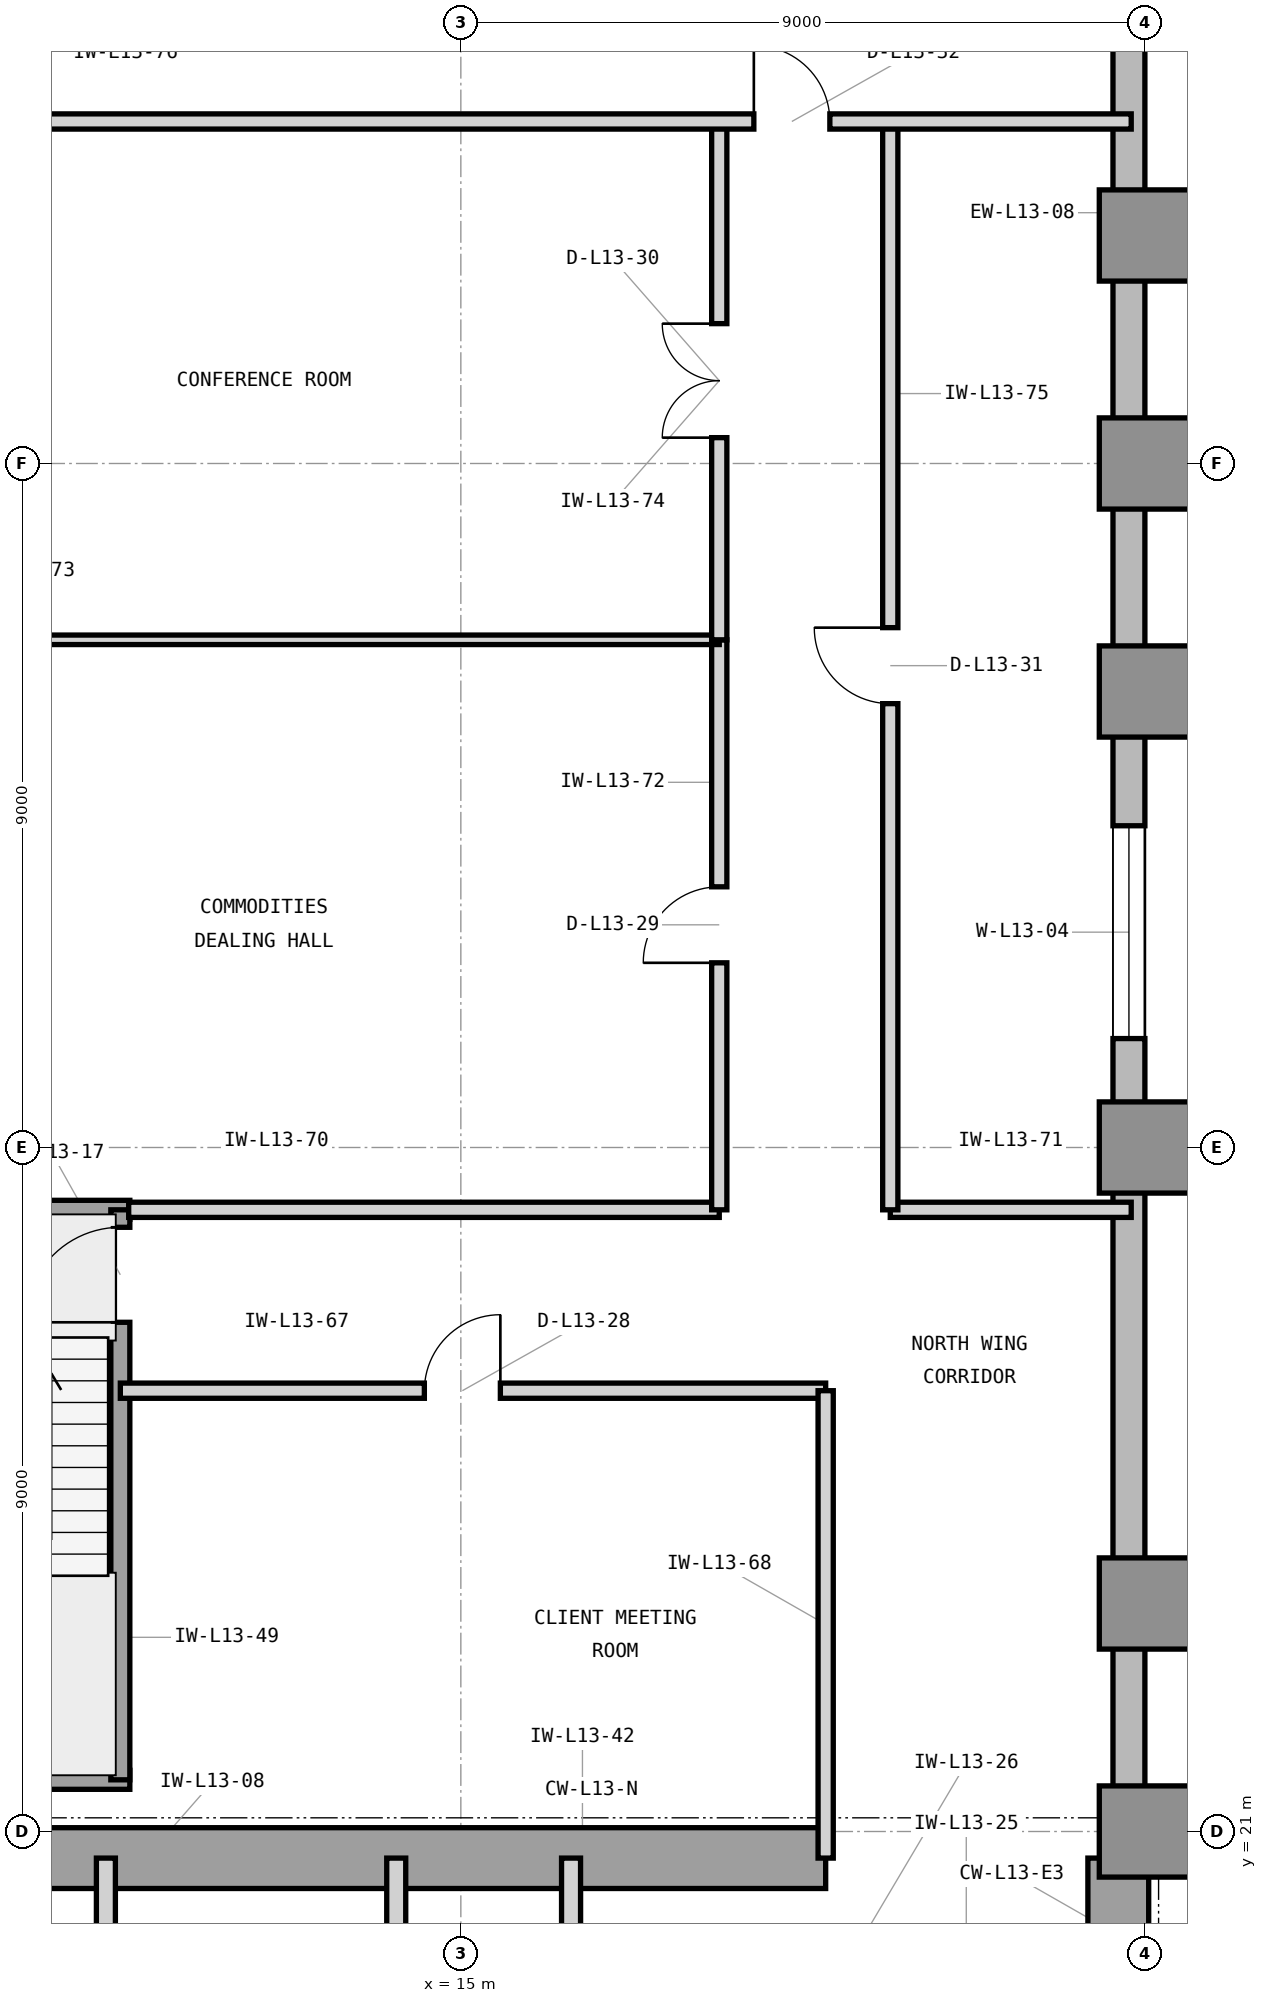
"""IFC4 building model, lengths in metres.
Left out: names, types, materials, properties, quantities, classifications, styles, units other than length and angle.
Written with IfcOpenShell. Run it as: python <this file> out.ifc"""

import sys

from ifc_helpers import new_model, si_unit, direction, frame, frame_2d, origin, origin_2d, place, context, subcontext, project, spatial, rectangle, extrude, element, fill, save


model = new_model("IFC4")
c1 = context("Model", 3, precision=1e-05, world=origin(), true_north=direction((0.0, 1.0)))
c2 = subcontext(c1, "Body", "Model", "MODEL_VIEW")
j1 = project(units=[si_unit("LENGTHUNIT", "METRE"), si_unit("PLANEANGLEUNIT", "RADIAN")], contexts=[c1])
p1 = place(None, origin())
s1 = spatial("IfcSite", under=j1, at=p1, CompositionType="ELEMENT")
p2 = place(p1, origin())
s2 = spatial("IfcBuilding", under=s1, at=p2, CompositionType="ELEMENT")
p3 = place(p2, frame((0.0, 0.0, 59.4)))
s3 = spatial("IfcBuildingStorey", under=s2, at=p3, CompositionType="ELEMENT", Elevation=59.4)
p4 = place(p3, frame((7.475, 20.65, 0.0), z_axis=(0.0, 0.0, 1.0), x_axis=(1.0, 0.0, 0.0)))
e1 = element("IfcWall", 1, at=p4, inside=s3, PredefinedType="SHEAR", context=c2, shape_type="SweptSolid", body=[
    extrude(rectangle(XDim=12.325, YDim=0.8, at=frame_2d((6.163, 0.0))), origin(), (0.0, 0.0, 1.0), 4.2),
])
p5 = place(p3, frame((23.65, 16.6, 0.0), z_axis=(0.0, 0.0, 1.0), x_axis=(0.0, 1.0, 0.0)))
e2 = element("IfcWall", 2, at=p5, inside=s3, PredefinedType="SHEAR", context=c2, shape_type="SweptSolid", body=[
    extrude(rectangle(XDim=4.05, YDim=0.8, at=frame_2d((2.025, 0.0))), origin(), (0.0, 0.0, 1.0), 4.2),
])
for number, where, z_axis, x_axis in (
    (3, (24.0, 21.0, 0.0), (0.0, 0.0, 1.0), (1.0, 0.0, 0.0)),
    (4, (24.0, 24.0, 0.0), (0.0, 0.0, 1.0), (1.0, 0.0, 0.0)),
    (5, (24.0, 30.0, 0.0), (0.0, 0.0, 1.0), (1.0, 0.0, 0.0)),
    (6, (24.0, 36.0, 0.0), (0.0, 0.0, 1.0), (1.0, 0.0, 0.0)),
    (7, (24.0, 39.0, 0.0), (0.0, 0.0, 1.0), (1.0, 0.0, 0.0)),
    (8, (24.0, 42.0, 0.0), (0.0, 0.0, 1.0), (1.0, 0.0, 0.0)),
):
    element("IfcColumn", number, at=place(p3, frame(where, z_axis=z_axis, x_axis=x_axis)), inside=s3, PredefinedType="COLUMN", context=c2, shape_type="SweptSolid", body=[
        extrude(rectangle(XDim=1.2, YDim=1.2, at=origin_2d()), origin(), (0.0, 0.0, 1.0), 4.2),
    ])
p6 = place(p3, frame((64.4, 20.79, 0.0), z_axis=(0.0, 0.0, 1.0), x_axis=(-1.0, 0.0, 0.0)))
e9 = element("IfcWall", 9, at=p6, inside=s3, PredefinedType="STANDARD", context=c2, shape_type="SweptSolid", body=[
    extrude(rectangle(XDim=40.4, YDim=0.42, at=frame_2d((20.2, 0.0))), origin(), (0.0, 0.0, 1.0), 3.98),
])
p7 = place(p6, frame((26.375, 0.0, 0.85)))
e10 = element("IfcOpeningElement", 10, at=p7, cuts=e9, PredefinedType="OPENING", context=c2, shape_type="SweptSolid", body=[
    extrude(rectangle(XDim=2.8, YDim=2.45, at=frame_2d((1.4, 1.225))), frame((0.0, 0.22, 0.0), z_axis=(0.0, -1.0, 0.0), x_axis=(1.0, 0.0, 0.0)), (0.0, 0.0, 1.0), 0.44),
])
p8 = place(p6, frame((38.222, 0.0, 0.85)))
e11 = element("IfcOpeningElement", 11, at=p8, cuts=e9, PredefinedType="OPENING", context=c2, shape_type="SweptSolid", body=[
    extrude(rectangle(XDim=1.2, YDim=2.45, at=frame_2d((0.6, 1.225))), frame((0.0, 0.22, 0.0), z_axis=(0.0, -1.0, 0.0), x_axis=(1.0, 0.0, 0.0)), (0.0, 0.0, 1.0), 0.44),
])
p9 = place(p6, frame((33.286, 0.0, 0.85)))
e12 = element("IfcOpeningElement", 12, at=p9, cuts=e9, PredefinedType="OPENING", context=c2, shape_type="SweptSolid", body=[
    extrude(rectangle(XDim=2.8, YDim=2.45, at=frame_2d((1.4, 1.225))), frame((0.0, 0.22, 0.0), z_axis=(0.0, -1.0, 0.0), x_axis=(1.0, 0.0, 0.0)), (0.0, 0.0, 1.0), 0.44),
])
p10 = place(p6, frame((18.636, 0.0, 0.85)))
e13 = element("IfcOpeningElement", 13, at=p10, cuts=e9, PredefinedType="OPENING", context=c2, shape_type="SweptSolid", body=[
    extrude(rectangle(XDim=2.8, YDim=2.45, at=frame_2d((1.4, 1.225))), frame((0.0, 0.22, 0.0), z_axis=(0.0, -1.0, 0.0), x_axis=(1.0, 0.0, 0.0)), (0.0, 0.0, 1.0), 0.44),
])
p11 = place(p6, frame((11.436, 0.0, 0.85)))
e14 = element("IfcOpeningElement", 14, at=p11, cuts=e9, PredefinedType="OPENING", context=c2, shape_type="SweptSolid", body=[
    extrude(rectangle(XDim=1.2, YDim=2.45, at=frame_2d((0.6, 1.225))), frame((0.0, 0.22, 0.0), z_axis=(0.0, -1.0, 0.0), x_axis=(1.0, 0.0, 0.0)), (0.0, 0.0, 1.0), 0.44),
])
p12 = place(p3, frame((23.79, 21.0, 0.0), z_axis=(0.0, 0.0, 1.0), x_axis=(0.0, 1.0, 0.0)))
e15 = element("IfcWall", 15, at=p12, inside=s3, PredefinedType="STANDARD", context=c2, shape_type="SweptSolid", body=[
    extrude(rectangle(XDim=28.4, YDim=0.42, at=frame_2d((14.2, 0.0))), origin(), (0.0, 0.0, 1.0), 3.98),
])
p13 = place(p12, frame((10.433, 0.0, 0.85)))
e16 = element("IfcOpeningElement", 16, at=p13, cuts=e15, PredefinedType="OPENING", context=c2, shape_type="SweptSolid", body=[
    extrude(rectangle(XDim=2.8, YDim=2.45, at=frame_2d((1.4, 1.225))), frame((0.0, 0.22, 0.0), z_axis=(0.0, -1.0, 0.0), x_axis=(1.0, 0.0, 0.0)), (0.0, 0.0, 1.0), 0.44),
])
p14 = place(p3, frame((10.33, 19.45, 0.0), z_axis=(0.0, 0.0, 1.0), x_axis=(0.0, 1.0, 0.0)))
e17 = element("IfcWall", 17, at=p14, inside=s3, PredefinedType="PARTITIONING", context=c2, shape_type="SweptSolid", body=[
    extrude(rectangle(XDim=1.2, YDim=0.25, at=frame_2d((0.6, 0.0))), origin(), (0.0, 0.0, 1.0), 3.114),
])
for number, where, z_axis, x_axis in (
    (18, (14.15, 16.7, 0.0), (0.0, 0.0, 1.0), (0.0, 1.0, 0.0)),
    (19, (16.45, 16.7, 0.0), (0.0, 0.0, 1.0), (0.0, 1.0, 0.0)),
):
    element("IfcWall", number, at=place(p3, frame(where, z_axis=z_axis, x_axis=x_axis)), inside=s3, PredefinedType="PARTITIONING", context=c2, shape_type="SweptSolid", body=[
        extrude(rectangle(XDim=3.95, YDim=0.25, at=frame_2d((1.975, 0.0))), origin(), (0.0, 0.0, 1.0), 3.97),
    ])
for number, where, z_axis, x_axis in (
    (20, (6.555, 21.68, 0.0), (0.0, 0.0, 1.0), (1.0, 0.0, 0.0)),
    (21, (6.555, 29.18, 0.0), (0.0, 0.0, 1.0), (1.0, 0.0, 0.0)),
):
    element("IfcWall", number, at=place(p3, frame(where, z_axis=z_axis, x_axis=x_axis)), inside=s3, PredefinedType="SHEAR", context=c2, shape_type="SweptSolid", body=[
        extrude(rectangle(XDim=4.09, YDim=0.25, at=frame_2d((2.045, 0.0))), origin(), (0.0, 0.0, 1.0), 4.2),
    ])
p15 = place(p3, frame((10.52, 21.68, 0.0), z_axis=(0.0, 0.0, 1.0), x_axis=(0.0, 1.0, 0.0)))
e22 = element("IfcWall", 22, at=p15, inside=s3, PredefinedType="SHEAR", context=c2, shape_type="SweptSolid", body=[
    extrude(rectangle(XDim=7.5, YDim=0.25, at=frame_2d((3.75, 0.0))), origin(), (0.0, 0.0, 1.0), 4.2),
])
p16 = place(p15, frame((6.02, 0.0, 0.0)))
e23 = element("IfcOpeningElement", 23, at=p16, cuts=e22, PredefinedType="OPENING", context=c2, shape_type="SweptSolid", body=[
    extrude(rectangle(XDim=1.25, YDim=2.2, at=frame_2d((0.625, 1.1))), frame((0.0, 0.135, 0.0), z_axis=(0.0, -1.0, 0.0), x_axis=(1.0, 0.0, 0.0)), (0.0, 0.0, 1.0), 0.27),
])
p17 = place(p3, frame((10.52, 26.8, 0.0), z_axis=(0.0, 0.0, 1.0), x_axis=(1.0, 0.0, 0.0)))
e24 = element("IfcWall", 24, at=p17, inside=s3, PredefinedType="PARTITIONING", context=c2, shape_type="SweptSolid", body=[
    extrude(rectangle(XDim=9.28, YDim=0.2, at=frame_2d((4.64, 0.0))), origin(), (0.0, 0.0, 1.0), 3.97),
])
p18 = place(p17, frame((4.0, 0.0, 0.0)))
e25 = element("IfcOpeningElement", 25, at=p18, cuts=e24, PredefinedType="OPENING", context=c2, shape_type="SweptSolid", body=[
    extrude(rectangle(XDim=1.0, YDim=2.15, at=frame_2d((0.5, 1.075))), frame((0.0, 0.11, 0.0), z_axis=(0.0, -1.0, 0.0), x_axis=(1.0, 0.0, 0.0)), (0.0, 0.0, 1.0), 0.22),
])
p19 = place(p3, frame((19.8, 20.65, 0.0), z_axis=(0.0, 0.0, 1.0), x_axis=(0.0, 1.0, 0.0)))
e26 = element("IfcWall", 26, at=p19, inside=s3, PredefinedType="PARTITIONING", context=c2, shape_type="SweptSolid", body=[
    extrude(rectangle(XDim=6.15, YDim=0.2, at=frame_2d((3.075, 0.0))), origin(), (0.0, 0.0, 1.0), 3.97),
])
p20 = place(p3, frame((10.63, 29.18, 0.0), z_axis=(0.0, 0.0, 1.0), x_axis=(1.0, 0.0, 0.0)))
e27 = element("IfcWall", 27, at=p20, inside=s3, PredefinedType="PARTITIONING", context=c2, shape_type="SweptSolid", body=[
    extrude(rectangle(XDim=7.77, YDim=0.2, at=frame_2d((3.885, 0.0))), origin(), (0.0, 0.0, 1.0), 3.97),
])
p21 = place(p3, frame((20.65, 29.18, 0.0), z_axis=(0.0, 0.0, 1.0), x_axis=(1.0, 0.0, 0.0)))
e28 = element("IfcWall", 28, at=p21, inside=s3, PredefinedType="PARTITIONING", context=c2, shape_type="SweptSolid", body=[
    extrude(rectangle(XDim=3.17, YDim=0.2, at=frame_2d((1.585, 0.0))), origin(), (0.0, 0.0, 1.0), 3.97),
])
p22 = place(p3, frame((18.4, 29.18, 0.0), z_axis=(0.0, 0.0, 1.0), x_axis=(0.0, 1.0, 0.0)))
e29 = element("IfcWall", 29, at=p22, inside=s3, PredefinedType="PARTITIONING", context=c2, shape_type="SweptSolid", body=[
    extrude(rectangle(XDim=7.5, YDim=0.2, at=frame_2d((3.75, 0.0))), origin(), (0.0, 0.0, 1.0), 3.97),
])
p23 = place(p22, frame((3.25, 0.0, 0.0)))
e30 = element("IfcOpeningElement", 30, at=p23, cuts=e29, PredefinedType="OPENING", context=c2, shape_type="SweptSolid", body=[
    extrude(rectangle(XDim=1.0, YDim=2.15, at=frame_2d((0.5, 1.075))), frame((0.0, 0.11, 0.0), z_axis=(0.0, -1.0, 0.0), x_axis=(1.0, 0.0, 0.0)), (0.0, 0.0, 1.0), 0.22),
])
p24 = place(p3, frame((6.18, 36.68, 0.0), z_axis=(0.0, 0.0, 1.0), x_axis=(1.0, 0.0, 0.0)))
e31 = element("IfcWall", 31, at=p24, inside=s3, PredefinedType="PARTITIONING", context=c2, shape_type="SweptSolid", body=[
    extrude(rectangle(XDim=12.22, YDim=0.125, at=frame_2d((6.11, 0.0))), origin(), (0.0, 0.0, 1.0), 3.97),
])
p25 = place(p3, frame((18.4, 36.68, 0.0), z_axis=(0.0, 0.0, 1.0), x_axis=(0.0, 1.0, 0.0)))
e32 = element("IfcWall", 32, at=p25, inside=s3, PredefinedType="PARTITIONING", context=c2, shape_type="SweptSolid", body=[
    extrude(rectangle(XDim=6.82, YDim=0.2, at=frame_2d((3.41, 0.0))), origin(), (0.0, 0.0, 1.0), 3.97),
])
p26 = place(p25, frame((2.66, 0.0, 0.0)))
e33 = element("IfcOpeningElement", 33, at=p26, cuts=e32, PredefinedType="OPENING", context=c2, shape_type="SweptSolid", body=[
    extrude(rectangle(XDim=1.5, YDim=2.3, at=frame_2d((0.75, 1.15))), frame((0.0, 0.11, 0.0), z_axis=(0.0, -1.0, 0.0), x_axis=(1.0, 0.0, 0.0)), (0.0, 0.0, 1.0), 0.22),
])
p27 = place(p3, frame((20.65, 29.18, 0.0), z_axis=(0.0, 0.0, 1.0), x_axis=(0.0, 1.0, 0.0)))
e34 = element("IfcWall", 34, at=p27, inside=s3, PredefinedType="PARTITIONING", context=c2, shape_type="SweptSolid", body=[
    extrude(rectangle(XDim=14.32, YDim=0.2, at=frame_2d((7.16, 0.0))), origin(), (0.0, 0.0, 1.0), 3.97),
])
p28 = place(p27, frame((6.66, 0.0, 0.0)))
e35 = element("IfcOpeningElement", 35, at=p28, cuts=e34, PredefinedType="OPENING", context=c2, shape_type="SweptSolid", body=[
    extrude(rectangle(XDim=1.0, YDim=2.15, at=frame_2d((0.5, 1.075))), frame((0.0, 0.11, 0.0), z_axis=(0.0, -1.0, 0.0), x_axis=(1.0, 0.0, 0.0)), (0.0, 0.0, 1.0), 0.22),
])
p29 = place(p3, frame((6.18, 43.5, 0.0), z_axis=(0.0, 0.0, 1.0), x_axis=(1.0, 0.0, 0.0)))
e36 = element("IfcWall", 36, at=p29, inside=s3, PredefinedType="PARTITIONING", context=c2, shape_type="SweptSolid", body=[
    extrude(rectangle(XDim=17.64, YDim=0.2, at=frame_2d((8.82, 0.0))), origin(), (0.0, 0.0, 1.0), 3.97),
])
p30 = place(p29, frame((12.675, 0.0, 0.0)))
e37 = element("IfcOpeningElement", 37, at=p30, cuts=e36, PredefinedType="OPENING", context=c2, shape_type="SweptSolid", body=[
    extrude(rectangle(XDim=1.0, YDim=2.15, at=frame_2d((0.5, 1.075))), frame((0.0, 0.11, 0.0), z_axis=(0.0, -1.0, 0.0), x_axis=(1.0, 0.0, 0.0)), (0.0, 0.0, 1.0), 0.22),
])
p31 = place(p13, origin())
e38 = element("IfcWindow", 38, at=p31, inside=s3, PartitioningType="SINGLE_PANEL", PredefinedType="WINDOW", context=c2, shape_type="SweptSolid", body=[
    extrude(rectangle(XDim=2.8, YDim=2.45, at=frame_2d((1.4, 1.225))), frame((0.0, 0.11, 0.0), z_axis=(0.0, -1.0, 0.0), x_axis=(1.0, 0.0, 0.0)), (0.0, 0.0, 1.0), 0.06),
])
fill(e16, e38)
p32 = place(p16, origin())
e39 = element("IfcDoor", 39, at=p32, inside=s3, OperationType="SINGLE_SWING_LEFT", PredefinedType="DOOR", context=c2, shape_type="SweptSolid", body=[
    extrude(rectangle(XDim=1.25, YDim=2.2, at=frame_2d((0.625, 1.1))), frame((0.0, 0.025, 0.0), z_axis=(0.0, -1.0, 0.0), x_axis=(1.0, 0.0, 0.0)), (0.0, 0.0, 1.0), 0.05),
])
fill(e23, e39)
p33 = place(p18, origin())
e40 = element("IfcDoor", 40, at=p33, inside=s3, OperationType="SINGLE_SWING_RIGHT", PredefinedType="DOOR", context=c2, shape_type="SweptSolid", body=[
    extrude(rectangle(XDim=1.0, YDim=2.15, at=frame_2d((0.5, 1.075))), frame((0.0, 0.025, 0.0), z_axis=(0.0, -1.0, 0.0), x_axis=(1.0, 0.0, 0.0)), (0.0, 0.0, 1.0), 0.05),
])
fill(e25, e40)
p34 = place(p23, origin())
e41 = element("IfcDoor", 41, at=p34, inside=s3, OperationType="SINGLE_SWING_LEFT", PredefinedType="DOOR", context=c2, shape_type="SweptSolid", body=[
    extrude(rectangle(XDim=1.0, YDim=2.15, at=frame_2d((0.5, 1.075))), frame((0.0, 0.025, 0.0), z_axis=(0.0, -1.0, 0.0), x_axis=(1.0, 0.0, 0.0)), (0.0, 0.0, 1.0), 0.05),
])
fill(e30, e41)
p35 = place(p26, origin())
e42 = element("IfcDoor", 42, at=p35, inside=s3, OperationType="DOUBLE_DOOR_SINGLE_SWING", PredefinedType="DOOR", context=c2, shape_type="SweptSolid", body=[
    extrude(rectangle(XDim=1.5, YDim=2.3, at=frame_2d((0.75, 1.15))), frame((0.0, 0.025, 0.0), z_axis=(0.0, -1.0, 0.0), x_axis=(1.0, 0.0, 0.0)), (0.0, 0.0, 1.0), 0.05),
])
fill(e33, e42)
p36 = place(p28, origin())
e43 = element("IfcDoor", 43, at=p36, inside=s3, OperationType="SINGLE_SWING_RIGHT", PredefinedType="DOOR", context=c2, shape_type="SweptSolid", body=[
    extrude(rectangle(XDim=1.0, YDim=2.15, at=frame_2d((0.5, 1.075))), frame((0.0, 0.025, 0.0), z_axis=(0.0, -1.0, 0.0), x_axis=(1.0, 0.0, 0.0)), (0.0, 0.0, 1.0), 0.05),
])
fill(e35, e43)
p37 = place(p30, origin())
e44 = element("IfcDoor", 44, at=p37, inside=s3, OperationType="SINGLE_SWING_LEFT", PredefinedType="DOOR", context=c2, shape_type="SweptSolid", body=[
    extrude(rectangle(XDim=1.0, YDim=2.15, at=frame_2d((0.5, 1.075))), frame((0.0, 0.025, 0.0), z_axis=(0.0, -1.0, 0.0), x_axis=(1.0, 0.0, 0.0)), (0.0, 0.0, 1.0), 0.05),
])
fill(e37, e44)
save(model, sys.argv[1])
